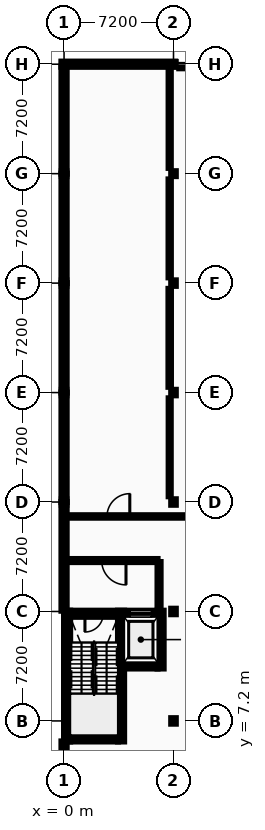
"""IFC4 building model, lengths in metres.
Left out: names, types, materials, properties, quantities, classifications, styles, units other than length and angle.
Written with IfcOpenShell. Run it as: python <this file> out.ifc"""

import sys

from ifc_helpers import new_model, si_unit, direction, frame, frame_2d, origin, origin_2d, place, context, subcontext, project, spatial, rectangle, i_section, extrude, element, fill, save


model = new_model("IFC4")
c1 = context("Model", 3, precision=1e-05, world=origin(), true_north=direction((0.0, 1.0)))
c2 = subcontext(c1, "Body", "Model", "MODEL_VIEW")
j1 = project(units=[si_unit("LENGTHUNIT", "METRE"), si_unit("PLANEANGLEUNIT", "RADIAN")], contexts=[c1])
p1 = place(None, origin())
s1 = spatial("IfcSite", under=j1, at=p1, CompositionType="ELEMENT")
p2 = place(p1, origin())
s2 = spatial("IfcBuilding", under=s1, at=p2, CompositionType="ELEMENT")
p3 = place(p2, frame((0.0, 0.0, 18.4)))
s3 = spatial("IfcBuildingStorey", under=s2, at=p3, CompositionType="ELEMENT", Elevation=18.4)
for number, where, z_axis, x_axis in (
    (1, (0.0, 21.6, 0.0), (0.0, 0.0, 1.0), (1.0, 0.0, 0.0)),
    (2, (0.0, 28.8, 0.0), (0.0, 0.0, 1.0), (1.0, 0.0, 0.0)),
    (3, (0.0, 36.0, 0.0), (0.0, 0.0, 1.0), (1.0, 0.0, 0.0)),
):
    element("IfcColumn", number, at=place(p3, frame(where, z_axis=z_axis, x_axis=x_axis)), inside=s3, PredefinedType="COLUMN", context=c2, shape_type="SweptSolid", body=[
        extrude(i_section(OverallWidth=0.3, OverallDepth=0.36, WebThickness=0.012, FlangeThickness=0.022, FilletRadius=0.027, at=origin_2d()), origin(), (0.0, 0.0, 1.0), 4.4),
    ])
p4 = place(p3, frame((0.0, 43.2, 0.0), z_axis=(0.0, 0.0, 1.0), x_axis=(1.0, 0.0, 0.0)))
e4 = element("IfcColumn", 4, at=p4, inside=s3, PredefinedType="COLUMN", context=c2, shape_type="SweptSolid", body=[
    extrude(i_section(OverallWidth=0.3, OverallDepth=0.32, WebThickness=0.011, FlangeThickness=0.021, FilletRadius=0.027, at=origin_2d()), origin(), (0.0, 0.0, 1.0), 4.4),
])
p5 = place(p3, frame((0.0, 50.4, 0.0), z_axis=(0.0, 0.0, 1.0), x_axis=(1.0, 0.0, 0.0)))
e5 = element("IfcColumn", 5, at=p5, inside=s3, PredefinedType="COLUMN", context=c2, shape_type="SweptSolid", body=[
    extrude(i_section(OverallWidth=0.28, OverallDepth=0.28, WebThickness=0.01, FlangeThickness=0.018, FilletRadius=0.024, at=origin_2d()), origin(), (0.0, 0.0, 1.0), 4.4),
])
for number, where, z_axis, x_axis in (
    (6, (7.2, 7.2, 0.0), (0.0, 0.0, 1.0), (1.0, 0.0, 0.0)),
    (7, (7.2, 14.4, 0.0), (0.0, 0.0, 1.0), (1.0, 0.0, 0.0)),
    (8, (7.2, 21.6, 0.0), (0.0, 0.0, 1.0), (1.0, 0.0, 0.0)),
    (9, (7.2, 28.8, 0.0), (0.0, 0.0, 1.0), (1.0, 0.0, 0.0)),
    (10, (7.2, 36.0, 0.0), (0.0, 0.0, 1.0), (1.0, 0.0, 0.0)),
):
    element("IfcColumn", number, at=place(p3, frame(where, z_axis=z_axis, x_axis=x_axis)), inside=s3, PredefinedType="COLUMN", context=c2, shape_type="SweptSolid", body=[
        extrude(i_section(OverallWidth=0.3, OverallDepth=0.36, WebThickness=0.012, FlangeThickness=0.022, FilletRadius=0.027, at=origin_2d()), origin(), (0.0, 0.0, 1.0), 4.4),
    ])
p6 = place(p3, frame((7.2, 43.2, 0.0), z_axis=(0.0, 0.0, 1.0), x_axis=(1.0, 0.0, 0.0)))
e11 = element("IfcColumn", 11, at=p6, inside=s3, PredefinedType="COLUMN", context=c2, shape_type="SweptSolid", body=[
    extrude(i_section(OverallWidth=0.3, OverallDepth=0.32, WebThickness=0.011, FlangeThickness=0.021, FilletRadius=0.027, at=origin_2d()), origin(), (0.0, 0.0, 1.0), 4.4),
])
p7 = place(p3, frame((7.2, 50.4, 0.0), z_axis=(0.0, 0.0, 1.0), x_axis=(1.0, 0.0, 0.0)))
e12 = element("IfcColumn", 12, at=p7, inside=s3, PredefinedType="COLUMN", context=c2, shape_type="SweptSolid", body=[
    extrude(i_section(OverallWidth=0.28, OverallDepth=0.28, WebThickness=0.01, FlangeThickness=0.018, FilletRadius=0.024, at=origin_2d()), origin(), (0.0, 0.0, 1.0), 4.4),
])
p8 = place(p3, frame((7.31, 50.4, 0.0), z_axis=(0.0, 0.0, 1.0), x_axis=(-1.0, 0.0, 0.0)))
e13 = element("IfcWall", 13, at=p8, inside=s3, PredefinedType="STANDARD", context=c2, shape_type="SweptSolid", body=[
    extrude(rectangle(XDim=7.48, YDim=0.34, at=frame_2d((3.74, 0.0))), origin(), (0.0, 0.0, 1.0), 3.915),
])
p9 = place(p8, frame((1.61, 0.0, 0.95)))
e14 = element("IfcOpeningElement", 14, at=p9, cuts=e13, PredefinedType="OPENING", context=c2, shape_type="SweptSolid", body=[
    extrude(rectangle(XDim=1.268, YDim=1.368, at=frame_2d((0.634, 0.684))), frame((0.0, 0.18, 0.0), z_axis=(0.0, -1.0, 0.0), x_axis=(1.0, 0.0, 0.0)), (0.0, 0.0, 1.0), 0.36),
])
p10 = place(p8, frame((4.602, 0.0, 0.95)))
e15 = element("IfcOpeningElement", 15, at=p10, cuts=e13, PredefinedType="OPENING", context=c2, shape_type="SweptSolid", body=[
    extrude(rectangle(XDim=1.268, YDim=1.368, at=frame_2d((0.634, 0.684))), frame((0.0, 0.18, 0.0), z_axis=(0.0, -1.0, 0.0), x_axis=(1.0, 0.0, 0.0)), (0.0, 0.0, 1.0), 0.36),
])
p11 = place(p3, frame((0.0, 5.85, 0.0), z_axis=(0.0, 0.0, 1.0), x_axis=(0.0, -1.0, 0.0)))
e16 = element("IfcWall", 16, at=p11, inside=s3, PredefinedType="STANDARD", context=c2, shape_type="SweptSolid", body=[
    extrude(rectangle(XDim=5.68, YDim=0.34, at=frame_2d((2.84, 0.0))), origin(), (0.0, 0.0, 1.0), 4.215),
])
p12 = place(p11, frame((2.393, 0.0, 0.95)))
e17 = element("IfcOpeningElement", 17, at=p12, cuts=e16, PredefinedType="OPENING", context=c2, shape_type="SweptSolid", body=[
    extrude(rectangle(XDim=0.894, YDim=1.404, at=frame_2d((0.447, 0.702))), frame((0.0, 0.18, 0.0), z_axis=(0.0, -1.0, 0.0), x_axis=(1.0, 0.0, 0.0)), (0.0, 0.0, 1.0), 0.36),
])
p13 = place(p3, frame((0.0, 21.6, 0.0), z_axis=(0.0, 0.0, 1.0), x_axis=(0.0, -1.0, 0.0)))
e18 = element("IfcWall", 18, at=p13, inside=s3, PredefinedType="STANDARD", context=c2, shape_type="SweptSolid", body=[
    extrude(rectangle(XDim=7.15, YDim=0.34, at=frame_2d((3.575, 0.0))), origin(), (0.0, 0.0, 1.0), 4.215),
])
p14 = place(p13, frame((1.681, 0.0, 0.95)))
e19 = element("IfcOpeningElement", 19, at=p14, cuts=e18, PredefinedType="OPENING", context=c2, shape_type="SweptSolid", body=[
    extrude(rectangle(XDim=0.928, YDim=1.404, at=frame_2d((0.464, 0.702))), frame((0.0, 0.18, 0.0), z_axis=(0.0, -1.0, 0.0), x_axis=(1.0, 0.0, 0.0)), (0.0, 0.0, 1.0), 0.36),
])
p15 = place(p13, frame((4.541, 0.0, 0.95)))
e20 = element("IfcOpeningElement", 20, at=p15, cuts=e18, PredefinedType="OPENING", context=c2, shape_type="SweptSolid", body=[
    extrude(rectangle(XDim=0.928, YDim=1.404, at=frame_2d((0.464, 0.702))), frame((0.0, 0.18, 0.0), z_axis=(0.0, -1.0, 0.0), x_axis=(1.0, 0.0, 0.0)), (0.0, 0.0, 1.0), 0.36),
])
p16 = place(p3, frame((0.0, 28.8, 0.0), z_axis=(0.0, 0.0, 1.0), x_axis=(0.0, -1.0, 0.0)))
e21 = element("IfcWall", 21, at=p16, inside=s3, PredefinedType="STANDARD", context=c2, shape_type="SweptSolid", body=[
    extrude(rectangle(XDim=7.2, YDim=0.34, at=frame_2d((3.6, 0.0))), origin(), (0.0, 0.0, 1.0), 3.9),
])
p17 = place(p16, frame((1.679, 0.0, 0.95)))
e22 = element("IfcOpeningElement", 22, at=p17, cuts=e21, PredefinedType="OPENING", context=c2, shape_type="SweptSolid", body=[
    extrude(rectangle(XDim=0.962, YDim=1.404, at=frame_2d((0.481, 0.702))), frame((0.0, 0.18, 0.0), z_axis=(0.0, -1.0, 0.0), x_axis=(1.0, 0.0, 0.0)), (0.0, 0.0, 1.0), 0.36),
])
p18 = place(p16, frame((4.559, 0.0, 0.95)))
e23 = element("IfcOpeningElement", 23, at=p18, cuts=e21, PredefinedType="OPENING", context=c2, shape_type="SweptSolid", body=[
    extrude(rectangle(XDim=0.962, YDim=1.404, at=frame_2d((0.481, 0.702))), frame((0.0, 0.18, 0.0), z_axis=(0.0, -1.0, 0.0), x_axis=(1.0, 0.0, 0.0)), (0.0, 0.0, 1.0), 0.36),
])
p19 = place(p3, frame((0.0, 36.0, 0.0), z_axis=(0.0, 0.0, 1.0), x_axis=(0.0, -1.0, 0.0)))
e24 = element("IfcWall", 24, at=p19, inside=s3, PredefinedType="STANDARD", context=c2, shape_type="SweptSolid", body=[
    extrude(rectangle(XDim=7.2, YDim=0.34, at=frame_2d((3.6, 0.0))), origin(), (0.0, 0.0, 1.0), 3.9),
])
p20 = place(p19, frame((1.662, 0.0, 0.95)))
e25 = element("IfcOpeningElement", 25, at=p20, cuts=e24, PredefinedType="OPENING", context=c2, shape_type="SweptSolid", body=[
    extrude(rectangle(XDim=0.996, YDim=1.404, at=frame_2d((0.498, 0.702))), frame((0.0, 0.18, 0.0), z_axis=(0.0, -1.0, 0.0), x_axis=(1.0, 0.0, 0.0)), (0.0, 0.0, 1.0), 0.36),
])
p21 = place(p19, frame((4.542, 0.0, 0.95)))
e26 = element("IfcOpeningElement", 26, at=p21, cuts=e24, PredefinedType="OPENING", context=c2, shape_type="SweptSolid", body=[
    extrude(rectangle(XDim=0.996, YDim=1.404, at=frame_2d((0.498, 0.702))), frame((0.0, 0.18, 0.0), z_axis=(0.0, -1.0, 0.0), x_axis=(1.0, 0.0, 0.0)), (0.0, 0.0, 1.0), 0.36),
])
p22 = place(p3, frame((0.0, 43.2, 0.0), z_axis=(0.0, 0.0, 1.0), x_axis=(0.0, -1.0, 0.0)))
e27 = element("IfcWall", 27, at=p22, inside=s3, PredefinedType="STANDARD", context=c2, shape_type="SweptSolid", body=[
    extrude(rectangle(XDim=7.2, YDim=0.34, at=frame_2d((3.6, 0.0))), origin(), (0.0, 0.0, 1.0), 3.9),
])
p23 = place(p22, frame((1.645, 0.0, 0.95)))
e28 = element("IfcOpeningElement", 28, at=p23, cuts=e27, PredefinedType="OPENING", context=c2, shape_type="SweptSolid", body=[
    extrude(rectangle(XDim=1.03, YDim=1.404, at=frame_2d((0.515, 0.702))), frame((0.0, 0.18, 0.0), z_axis=(0.0, -1.0, 0.0), x_axis=(1.0, 0.0, 0.0)), (0.0, 0.0, 1.0), 0.36),
])
p24 = place(p22, frame((4.525, 0.0, 0.95)))
e29 = element("IfcOpeningElement", 29, at=p24, cuts=e27, PredefinedType="OPENING", context=c2, shape_type="SweptSolid", body=[
    extrude(rectangle(XDim=1.03, YDim=1.404, at=frame_2d((0.515, 0.702))), frame((0.0, 0.18, 0.0), z_axis=(0.0, -1.0, 0.0), x_axis=(1.0, 0.0, 0.0)), (0.0, 0.0, 1.0), 0.36),
])
p25 = place(p3, frame((0.0, 50.23, 0.0), z_axis=(0.0, 0.0, 1.0), x_axis=(0.0, -1.0, 0.0)))
e30 = element("IfcWall", 30, at=p25, inside=s3, PredefinedType="STANDARD", context=c2, shape_type="SweptSolid", body=[
    extrude(rectangle(XDim=7.03, YDim=0.34, at=frame_2d((3.515, 0.0))), origin(), (0.0, 0.0, 1.0), 3.865),
])
p26 = place(p25, frame((1.577, 0.0, 0.95)))
e31 = element("IfcOpeningElement", 31, at=p26, cuts=e30, PredefinedType="OPENING", context=c2, shape_type="SweptSolid", body=[
    extrude(rectangle(XDim=1.064, YDim=1.404, at=frame_2d((0.532, 0.702))), frame((0.0, 0.18, 0.0), z_axis=(0.0, -1.0, 0.0), x_axis=(1.0, 0.0, 0.0)), (0.0, 0.0, 1.0), 0.36),
])
p27 = place(p25, frame((4.389, 0.0, 0.95)))
e32 = element("IfcOpeningElement", 32, at=p27, cuts=e30, PredefinedType="OPENING", context=c2, shape_type="SweptSolid", body=[
    extrude(rectangle(XDim=1.064, YDim=1.404, at=frame_2d((0.532, 0.702))), frame((0.0, 0.18, 0.0), z_axis=(0.0, -1.0, 0.0), x_axis=(1.0, 0.0, 0.0)), (0.0, 0.0, 1.0), 0.36),
])
p28 = place(p3, frame((0.4, 6.05, 0.0), z_axis=(0.0, 0.0, 1.0), x_axis=(1.0, 0.0, 0.0)))
e33 = element("IfcWall", 33, at=p28, inside=s3, PredefinedType="SHEAR", context=c2, shape_type="SweptSolid", body=[
    extrude(rectangle(XDim=3.15, YDim=0.4, at=frame_2d((1.575, 0.0))), origin(), (0.0, 0.0, 1.0), 4.215),
])
p29 = place(p3, frame((0.4, 14.25, 0.0), z_axis=(0.0, 0.0, 1.0), x_axis=(1.0, 0.0, 0.0)))
e34 = element("IfcWall", 34, at=p29, inside=s3, PredefinedType="SHEAR", context=c2, shape_type="SweptSolid", body=[
    extrude(rectangle(XDim=3.15, YDim=0.4, at=frame_2d((1.575, 0.0))), origin(), (0.0, 0.0, 1.0), 4.215),
])
p30 = place(p29, frame((0.975, 0.0, 0.0)))
e35 = element("IfcOpeningElement", 35, at=p30, cuts=e34, PredefinedType="OPENING", context=c2, shape_type="SweptSolid", body=[
    extrude(rectangle(XDim=1.2, YDim=2.15, at=frame_2d((0.6, 1.075))), frame((0.0, 0.21, 0.0), z_axis=(0.0, -1.0, 0.0), x_axis=(1.0, 0.0, 0.0)), (0.0, 0.0, 1.0), 0.42),
])
for number, where, z_axis, x_axis in (
    (36, (0.2, 5.85, 0.0), (0.0, 0.0, 1.0), (0.0, 1.0, 0.0)),
    (37, (3.75, 5.85, 0.0), (0.0, 0.0, 1.0), (0.0, 1.0, 0.0)),
):
    element("IfcWall", number, at=place(p3, frame(where, z_axis=z_axis, x_axis=x_axis)), inside=s3, PredefinedType="SHEAR", context=c2, shape_type="SweptSolid", body=[
        extrude(rectangle(XDim=8.6, YDim=0.4, at=frame_2d((4.3, 0.0))), origin(), (0.0, 0.0, 1.0), 4.215),
    ])
p31 = place(p3, frame((3.95, 10.85, 0.0), z_axis=(0.0, 0.0, 1.0), x_axis=(1.0, 0.0, 0.0)))
e38 = element("IfcWall", 38, at=p31, inside=s3, PredefinedType="SHEAR", context=c2, shape_type="SweptSolid", body=[
    extrude(rectangle(XDim=2.2, YDim=0.4, at=frame_2d((1.1, 0.0))), origin(), (0.0, 0.0, 1.0), 4.215),
])
p32 = place(p3, frame((3.95, 14.25, 0.0), z_axis=(0.0, 0.0, 1.0), x_axis=(1.0, 0.0, 0.0)))
e39 = element("IfcWall", 39, at=p32, inside=s3, PredefinedType="SHEAR", context=c2, shape_type="SweptSolid", body=[
    extrude(rectangle(XDim=2.2, YDim=0.4, at=frame_2d((1.1, 0.0))), origin(), (0.0, 0.0, 1.0), 4.215),
])
p33 = place(p32, frame((0.4, 0.0, 0.0)))
e40 = element("IfcOpeningElement", 40, at=p33, cuts=e39, PredefinedType="OPENING", context=c2, shape_type="SweptSolid", body=[
    extrude(rectangle(XDim=1.4, YDim=2.2, at=frame_2d((0.7, 1.1))), frame((0.0, 0.21, 0.0), z_axis=(0.0, -1.0, 0.0), x_axis=(1.0, 0.0, 0.0)), (0.0, 0.0, 1.0), 0.42),
])
p34 = place(p3, frame((6.35, 10.65, 0.0), z_axis=(0.0, 0.0, 1.0), x_axis=(0.0, 1.0, 0.0)))
e41 = element("IfcWall", 41, at=p34, inside=s3, PredefinedType="SHEAR", context=c2, shape_type="SweptSolid", body=[
    extrude(rectangle(XDim=3.8, YDim=0.4, at=frame_2d((1.9, 0.0))), origin(), (0.0, 0.0, 1.0), 4.215),
])
p35 = place(p3, frame((0.4, 17.75, 0.0), z_axis=(0.0, 0.0, 1.0), x_axis=(1.0, 0.0, 0.0)))
e42 = element("IfcWall", 42, at=p35, inside=s3, PredefinedType="PARTITIONING", context=c2, shape_type="SweptSolid", body=[
    extrude(rectangle(XDim=5.75, YDim=0.2, at=frame_2d((2.875, 0.0))), origin(), (0.0, 0.0, 1.0), 4.215),
])
p36 = place(p35, frame((2.075, 0.0, 0.0)))
e43 = element("IfcOpeningElement", 43, at=p36, cuts=e42, PredefinedType="OPENING", context=c2, shape_type="SweptSolid", body=[
    extrude(rectangle(XDim=1.6, YDim=2.2, at=frame_2d((0.8, 1.1))), frame((0.0, 0.11, 0.0), z_axis=(0.0, -1.0, 0.0), x_axis=(1.0, 0.0, 0.0)), (0.0, 0.0, 1.0), 0.22),
])
p37 = place(p3, frame((6.25, 14.45, 0.0), z_axis=(0.0, 0.0, 1.0), x_axis=(0.0, 1.0, 0.0)))
e44 = element("IfcWall", 44, at=p37, inside=s3, PredefinedType="PARTITIONING", context=c2, shape_type="SweptSolid", body=[
    extrude(rectangle(XDim=3.2, YDim=0.2, at=frame_2d((1.6, 0.0))), origin(), (0.0, 0.0, 1.0), 4.215),
])
p38 = place(p3, frame((0.2, 20.65, 0.0), z_axis=(0.0, 0.0, 1.0), x_axis=(1.0, 0.0, 0.0)))
e45 = element("IfcWall", 45, at=p38, inside=s3, PredefinedType="PARTITIONING", context=c2, shape_type="SweptSolid", body=[
    extrude(rectangle(XDim=13.9, YDim=0.16, at=frame_2d((6.95, 0.0))), origin(), (0.0, 0.0, 1.0), 4.215),
])
p39 = place(p38, frame((2.625, 0.0, 0.0)))
e46 = element("IfcOpeningElement", 46, at=p39, cuts=e45, PredefinedType="OPENING", context=c2, shape_type="SweptSolid", body=[
    extrude(rectangle(XDim=1.5, YDim=2.2, at=frame_2d((0.75, 1.1))), frame((0.0, 0.09, 0.0), z_axis=(0.0, -1.0, 0.0), x_axis=(1.0, 0.0, 0.0)), (0.0, 0.0, 1.0), 0.18),
])
p40 = place(p38, frame((9.425, 0.0, 0.0)))
e47 = element("IfcOpeningElement", 47, at=p40, cuts=e45, PredefinedType="OPENING", context=c2, shape_type="SweptSolid", body=[
    extrude(rectangle(XDim=1.8, YDim=2.3, at=frame_2d((0.9, 1.15))), frame((0.0, 0.09, 0.0), z_axis=(0.0, -1.0, 0.0), x_axis=(1.0, 0.0, 0.0)), (0.0, 0.0, 1.0), 0.18),
])
p41 = place(p3, frame((7.58, 50.2, 0.0), z_axis=(0.0, 0.0, 1.0), x_axis=(1.0, 0.0, 0.0)))
e48 = element("IfcWall", 48, at=p41, inside=s3, PredefinedType="PARTITIONING", context=c2, shape_type="SweptSolid", body=[
    extrude(rectangle(XDim=6.44, YDim=0.135, at=frame_2d((3.22, 0.0))), origin(), (0.0, 0.0, 1.0), 3.915),
])
p42 = place(p3, frame((6.95, 21.98, 0.0), z_axis=(0.0, 0.0, 1.0), x_axis=(0.0, 1.0, 0.0)))
e49 = element("IfcWall", 49, at=p42, inside=s3, PredefinedType="PARTITIONING", context=c2, shape_type="SweptSolid", body=[
    extrude(rectangle(XDim=6.44, YDim=0.135, at=frame_2d((3.22, 0.0))), origin(), (0.0, 0.0, 1.0), 3.91),
])
p43 = place(p3, frame((6.95, 29.18, 0.0), z_axis=(0.0, 0.0, 1.0), x_axis=(0.0, 1.0, 0.0)))
e50 = element("IfcWall", 50, at=p43, inside=s3, PredefinedType="PARTITIONING", context=c2, shape_type="SweptSolid", body=[
    extrude(rectangle(XDim=6.44, YDim=0.16, at=frame_2d((3.22, 0.0))), origin(), (0.0, 0.0, 1.0), 3.91),
])
p44 = place(p3, frame((6.95, 36.38, 0.0), z_axis=(0.0, 0.0, 1.0), x_axis=(0.0, 1.0, 0.0)))
e51 = element("IfcWall", 51, at=p44, inside=s3, PredefinedType="PARTITIONING", context=c2, shape_type="SweptSolid", body=[
    extrude(rectangle(XDim=6.44, YDim=0.15, at=frame_2d((3.22, 0.0))), origin(), (0.0, 0.0, 1.0), 3.91),
])
p45 = place(p3, frame((6.95, 43.58, 0.0), z_axis=(0.0, 0.0, 1.0), x_axis=(0.0, 1.0, 0.0)))
e52 = element("IfcWall", 52, at=p45, inside=s3, PredefinedType="PARTITIONING", context=c2, shape_type="SweptSolid", body=[
    extrude(rectangle(XDim=6.44, YDim=0.142, at=frame_2d((3.22, 0.0))), origin(), (0.0, 0.0, 1.0), 3.875),
])
p46 = place(p9, origin())
e53 = element("IfcWindow", 53, at=p46, inside=s3, PartitioningType="SINGLE_PANEL", PredefinedType="WINDOW", context=c2, shape_type="SweptSolid", body=[
    extrude(rectangle(XDim=1.268, YDim=1.368, at=frame_2d((0.634, 0.684))), frame((0.0, 0.03, 0.0), z_axis=(0.0, -1.0, 0.0), x_axis=(1.0, 0.0, 0.0)), (0.0, 0.0, 1.0), 0.06),
])
fill(e14, e53)
p47 = place(p10, origin())
e54 = element("IfcWindow", 54, at=p47, inside=s3, PartitioningType="SINGLE_PANEL", PredefinedType="WINDOW", context=c2, shape_type="SweptSolid", body=[
    extrude(rectangle(XDim=1.268, YDim=1.368, at=frame_2d((0.634, 0.684))), frame((0.0, 0.03, 0.0), z_axis=(0.0, -1.0, 0.0), x_axis=(1.0, 0.0, 0.0)), (0.0, 0.0, 1.0), 0.06),
])
fill(e15, e54)
p48 = place(p14, origin())
e55 = element("IfcWindow", 55, at=p48, inside=s3, PartitioningType="SINGLE_PANEL", PredefinedType="WINDOW", context=c2, shape_type="SweptSolid", body=[
    extrude(rectangle(XDim=0.928, YDim=1.404, at=frame_2d((0.464, 0.702))), frame((0.0, 0.03, 0.0), z_axis=(0.0, -1.0, 0.0), x_axis=(1.0, 0.0, 0.0)), (0.0, 0.0, 1.0), 0.06),
])
fill(e19, e55)
p49 = place(p15, origin())
e56 = element("IfcWindow", 56, at=p49, inside=s3, PartitioningType="SINGLE_PANEL", PredefinedType="WINDOW", context=c2, shape_type="SweptSolid", body=[
    extrude(rectangle(XDim=0.928, YDim=1.404, at=frame_2d((0.464, 0.702))), frame((0.0, 0.03, 0.0), z_axis=(0.0, -1.0, 0.0), x_axis=(1.0, 0.0, 0.0)), (0.0, 0.0, 1.0), 0.06),
])
fill(e20, e56)
p50 = place(p17, origin())
e57 = element("IfcWindow", 57, at=p50, inside=s3, PartitioningType="SINGLE_PANEL", PredefinedType="WINDOW", context=c2, shape_type="SweptSolid", body=[
    extrude(rectangle(XDim=0.962, YDim=1.404, at=frame_2d((0.481, 0.702))), frame((0.0, 0.03, 0.0), z_axis=(0.0, -1.0, 0.0), x_axis=(1.0, 0.0, 0.0)), (0.0, 0.0, 1.0), 0.06),
])
fill(e22, e57)
p51 = place(p18, origin())
e58 = element("IfcWindow", 58, at=p51, inside=s3, PartitioningType="SINGLE_PANEL", PredefinedType="WINDOW", context=c2, shape_type="SweptSolid", body=[
    extrude(rectangle(XDim=0.962, YDim=1.404, at=frame_2d((0.481, 0.702))), frame((0.0, 0.03, 0.0), z_axis=(0.0, -1.0, 0.0), x_axis=(1.0, 0.0, 0.0)), (0.0, 0.0, 1.0), 0.06),
])
fill(e23, e58)
p52 = place(p20, origin())
e59 = element("IfcWindow", 59, at=p52, inside=s3, PartitioningType="SINGLE_PANEL", PredefinedType="WINDOW", context=c2, shape_type="SweptSolid", body=[
    extrude(rectangle(XDim=0.996, YDim=1.404, at=frame_2d((0.498, 0.702))), frame((0.0, 0.03, 0.0), z_axis=(0.0, -1.0, 0.0), x_axis=(1.0, 0.0, 0.0)), (0.0, 0.0, 1.0), 0.06),
])
fill(e25, e59)
p53 = place(p21, origin())
e60 = element("IfcWindow", 60, at=p53, inside=s3, PartitioningType="SINGLE_PANEL", PredefinedType="WINDOW", context=c2, shape_type="SweptSolid", body=[
    extrude(rectangle(XDim=0.996, YDim=1.404, at=frame_2d((0.498, 0.702))), frame((0.0, 0.03, 0.0), z_axis=(0.0, -1.0, 0.0), x_axis=(1.0, 0.0, 0.0)), (0.0, 0.0, 1.0), 0.06),
])
fill(e26, e60)
p54 = place(p23, origin())
e61 = element("IfcWindow", 61, at=p54, inside=s3, PartitioningType="SINGLE_PANEL", PredefinedType="WINDOW", context=c2, shape_type="SweptSolid", body=[
    extrude(rectangle(XDim=1.03, YDim=1.404, at=frame_2d((0.515, 0.702))), frame((0.0, 0.03, 0.0), z_axis=(0.0, -1.0, 0.0), x_axis=(1.0, 0.0, 0.0)), (0.0, 0.0, 1.0), 0.06),
])
fill(e28, e61)
p55 = place(p24, origin())
e62 = element("IfcWindow", 62, at=p55, inside=s3, PartitioningType="SINGLE_PANEL", PredefinedType="WINDOW", context=c2, shape_type="SweptSolid", body=[
    extrude(rectangle(XDim=1.03, YDim=1.404, at=frame_2d((0.515, 0.702))), frame((0.0, 0.03, 0.0), z_axis=(0.0, -1.0, 0.0), x_axis=(1.0, 0.0, 0.0)), (0.0, 0.0, 1.0), 0.06),
])
fill(e29, e62)
p56 = place(p26, origin())
e63 = element("IfcWindow", 63, at=p56, inside=s3, PartitioningType="SINGLE_PANEL", PredefinedType="WINDOW", context=c2, shape_type="SweptSolid", body=[
    extrude(rectangle(XDim=1.064, YDim=1.404, at=frame_2d((0.532, 0.702))), frame((0.0, 0.03, 0.0), z_axis=(0.0, -1.0, 0.0), x_axis=(1.0, 0.0, 0.0)), (0.0, 0.0, 1.0), 0.06),
])
fill(e31, e63)
p57 = place(p27, origin())
e64 = element("IfcWindow", 64, at=p57, inside=s3, PartitioningType="SINGLE_PANEL", PredefinedType="WINDOW", context=c2, shape_type="SweptSolid", body=[
    extrude(rectangle(XDim=1.064, YDim=1.404, at=frame_2d((0.532, 0.702))), frame((0.0, 0.03, 0.0), z_axis=(0.0, -1.0, 0.0), x_axis=(1.0, 0.0, 0.0)), (0.0, 0.0, 1.0), 0.06),
])
fill(e32, e64)
p58 = place(p30, frame((1.2, 0.0, 0.0), z_axis=(0.0, 0.0, 1.0), x_axis=(-1.0, 0.0, 0.0)))
e65 = element("IfcDoor", 65, at=p58, inside=s3, OperationType="SINGLE_SWING_LEFT", PredefinedType="DOOR", context=c2, shape_type="SweptSolid", body=[
    extrude(rectangle(XDim=1.2, YDim=2.15, at=frame_2d((0.6, 1.075))), frame((0.0, 0.025, 0.0), z_axis=(0.0, -1.0, 0.0), x_axis=(1.0, 0.0, 0.0)), (0.0, 0.0, 1.0), 0.05),
])
fill(e35, e65)
p59 = place(p33, origin())
e66 = element("IfcDoor", 66, at=p59, inside=s3, OperationType="SLIDING_TO_LEFT", PredefinedType="DOOR", context=c2, shape_type="SweptSolid", body=[
    extrude(rectangle(XDim=1.4, YDim=2.2, at=frame_2d((0.7, 1.1))), frame((0.0, 0.025, 0.0), z_axis=(0.0, -1.0, 0.0), x_axis=(1.0, 0.0, 0.0)), (0.0, 0.0, 1.0), 0.05),
])
fill(e40, e66)
p60 = place(p36, origin())
e67 = element("IfcDoor", 67, at=p60, inside=s3, OperationType="DOUBLE_DOOR_SINGLE_SWING", PredefinedType="DOOR", context=c2, shape_type="SweptSolid", body=[
    extrude(rectangle(XDim=1.6, YDim=2.2, at=frame_2d((0.8, 1.1))), frame((0.0, 0.025, 0.0), z_axis=(0.0, -1.0, 0.0), x_axis=(1.0, 0.0, 0.0)), (0.0, 0.0, 1.0), 0.05),
])
fill(e43, e67)
p61 = place(p39, frame((1.5, 0.0, 0.0), z_axis=(0.0, 0.0, 1.0), x_axis=(-1.0, 0.0, 0.0)))
e68 = element("IfcDoor", 68, at=p61, inside=s3, OperationType="DOUBLE_DOOR_SINGLE_SWING", PredefinedType="DOOR", context=c2, shape_type="SweptSolid", body=[
    extrude(rectangle(XDim=1.5, YDim=2.2, at=frame_2d((0.75, 1.1))), frame((0.0, 0.025, 0.0), z_axis=(0.0, -1.0, 0.0), x_axis=(1.0, 0.0, 0.0)), (0.0, 0.0, 1.0), 0.05),
])
fill(e46, e68)
save(model, sys.argv[1])
